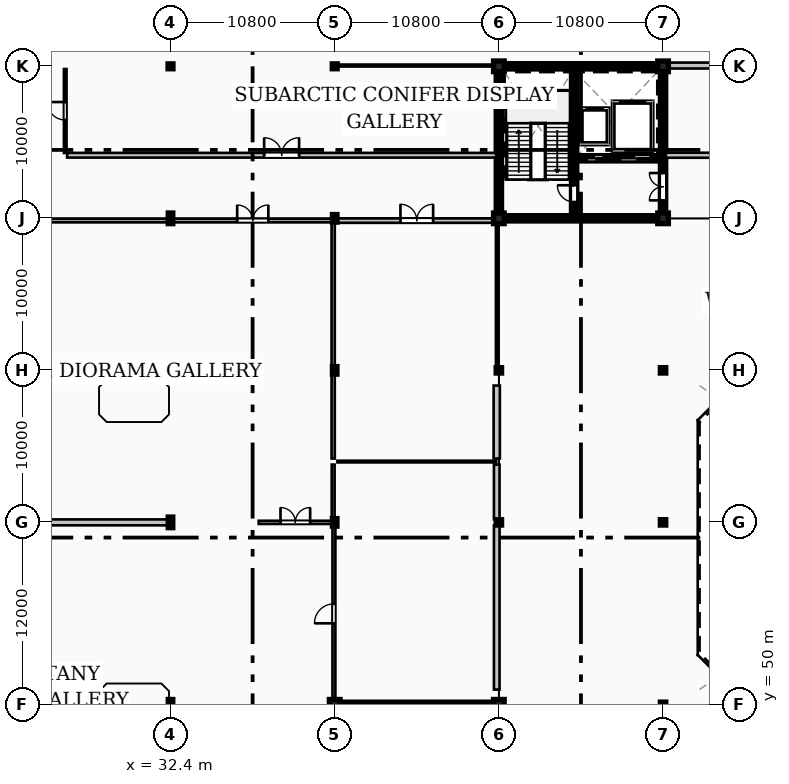
"""IFC4 building model, lengths in metres.
Left out: names, types, materials, properties, quantities, classifications, styles, units other than length and angle.
Written with IfcOpenShell. Run it as: python <this file> out.ifc"""

import sys

from ifc_helpers import new_model, si_unit, direction, frame, frame_2d, origin, origin_2d, place, context, subcontext, project, spatial, rectangle, hollow_circle, i_section, extrude, element, fill, save


model = new_model("IFC4")
c1 = context("Model", 3, precision=1e-05, world=origin(), true_north=direction((0.0, 1.0)))
c2 = subcontext(c1, "Body", "Model", "MODEL_VIEW")
j1 = project(units=[si_unit("LENGTHUNIT", "METRE"), si_unit("PLANEANGLEUNIT", "RADIAN")], contexts=[c1])
p1 = place(None, origin())
s1 = spatial("IfcSite", under=j1, at=p1, CompositionType="ELEMENT")
p2 = place(p1, origin())
s2 = spatial("IfcBuilding", under=s1, at=p2, CompositionType="ELEMENT")
p3 = place(p2, frame((0.0, 0.0, 4.8)))
s3 = spatial("IfcBuildingStorey", under=s2, at=p3, CompositionType="ELEMENT", Elevation=4.8)
for number, where, z_axis, x_axis in (
    (1, (32.4, 50.0, 0.0), (0.0, 0.0, 1.0), (1.0, 0.0, 0.0)),
    (2, (32.4, 62.0, 0.0), (0.0, 0.0, 1.0), (1.0, 0.0, 0.0)),
    (3, (32.4, 72.0, 0.0), (0.0, 0.0, 1.0), (1.0, 0.0, 0.0)),
    (4, (32.4, 82.0, 0.0), (0.0, 0.0, 1.0), (1.0, 0.0, 0.0)),
):
    element("IfcColumn", number, at=place(p3, frame(where, z_axis=z_axis, x_axis=x_axis)), inside=s3, PredefinedType="COLUMN", context=c2, shape_type="SweptSolid", body=[
        extrude(i_section(OverallWidth=0.3, OverallDepth=0.7, WebThickness=0.017, FlangeThickness=0.032, FilletRadius=0.027, at=origin_2d()), origin(), (0.0, 0.0, 1.0), 4.8),
    ])
p4 = place(p3, frame((32.4, 92.0, 0.0), z_axis=(0.0, 0.0, 1.0), x_axis=(1.0, 0.0, 0.0)))
e5 = element("IfcColumn", 5, at=p4, inside=s3, PredefinedType="COLUMN", context=c2, shape_type="SweptSolid", body=[
    extrude(hollow_circle(Radius=0.162, WallThickness=0.014, at=origin_2d()), origin(), (0.0, 0.0, 1.0), 4.8),
])
p5 = place(p3, frame((43.2, 50.0, 0.0), z_axis=(0.0, 0.0, 1.0), x_axis=(1.0, 0.0, 0.0)))
e6 = element("IfcColumn", 6, at=p5, inside=s3, PredefinedType="COLUMN", context=c2, shape_type="SweptSolid", body=[
    extrude(rectangle(XDim=0.7, YDim=0.7, at=origin_2d()), origin(), (0.0, 0.0, 1.0), 4.8),
])
for number, where, z_axis, x_axis in (
    (7, (43.2, 62.0, 0.0), (0.0, 0.0, 1.0), (1.0, 0.0, 0.0)),
    (8, (43.2, 72.0, 0.0), (0.0, 0.0, 1.0), (1.0, 0.0, 0.0)),
    (9, (43.2, 82.0, 0.0), (0.0, 0.0, 1.0), (1.0, 0.0, 0.0)),
):
    element("IfcColumn", number, at=place(p3, frame(where, z_axis=z_axis, x_axis=x_axis)), inside=s3, PredefinedType="COLUMN", context=c2, shape_type="SweptSolid", body=[
        extrude(i_section(OverallWidth=0.3, OverallDepth=0.5, WebThickness=0.014, FlangeThickness=0.028, FilletRadius=0.027, at=origin_2d()), origin(), (0.0, 0.0, 1.0), 4.8),
    ])
p6 = place(p3, frame((43.2, 92.0, 0.0), z_axis=(0.0, 0.0, 1.0), x_axis=(1.0, 0.0, 0.0)))
e10 = element("IfcColumn", 10, at=p6, inside=s3, PredefinedType="COLUMN", context=c2, shape_type="SweptSolid", body=[
    extrude(hollow_circle(Radius=0.162, WallThickness=0.014, at=origin_2d()), origin(), (0.0, 0.0, 1.0), 4.8),
])
p7 = place(p3, frame((54.0, 50.0, 0.0), z_axis=(0.0, 0.0, 1.0), x_axis=(1.0, 0.0, 0.0)))
e11 = element("IfcColumn", 11, at=p7, inside=s3, PredefinedType="COLUMN", context=c2, shape_type="SweptSolid", body=[
    extrude(rectangle(XDim=0.7, YDim=0.7, at=origin_2d()), origin(), (0.0, 0.0, 1.0), 4.8),
])
for number, where, z_axis, x_axis in (
    (12, (54.0, 62.0, 0.0), (0.0, 0.0, 1.0), (1.0, 0.0, 0.0)),
    (13, (54.0, 72.0, 0.0), (0.0, 0.0, 1.0), (1.0, 0.0, 0.0)),
):
    element("IfcColumn", number, at=place(p3, frame(where, z_axis=z_axis, x_axis=x_axis)), inside=s3, PredefinedType="COLUMN", context=c2, shape_type="SweptSolid", body=[
        extrude(hollow_circle(Radius=0.178, WallThickness=0.016, at=origin_2d()), origin(), (0.0, 0.0, 1.0), 4.8),
    ])
for number, where, z_axis, x_axis in (
    (14, (54.0, 82.0, 0.0), (0.0, 0.0, 1.0), (1.0, 0.0, 0.0)),
    (15, (54.0, 92.0, 0.0), (0.0, 0.0, 1.0), (1.0, 0.0, 0.0)),
):
    element("IfcColumn", number, at=place(p3, frame(where, z_axis=z_axis, x_axis=x_axis)), inside=s3, PredefinedType="COLUMN", context=c2, shape_type="SweptSolid", body=[
        extrude(rectangle(XDim=0.7, YDim=0.7, at=origin_2d()), origin(), (0.0, 0.0, 1.0), 4.8),
    ])
for number, where, z_axis, x_axis in (
    (16, (64.8, 50.0, 0.0), (0.0, 0.0, 1.0), (1.0, 0.0, 0.0)),
    (17, (64.8, 62.0, 0.0), (0.0, 0.0, 1.0), (1.0, 0.0, 0.0)),
    (18, (64.8, 72.0, 0.0), (0.0, 0.0, 1.0), (1.0, 0.0, 0.0)),
):
    element("IfcColumn", number, at=place(p3, frame(where, z_axis=z_axis, x_axis=x_axis)), inside=s3, PredefinedType="COLUMN", context=c2, shape_type="SweptSolid", body=[
        extrude(hollow_circle(Radius=0.178, WallThickness=0.016, at=origin_2d()), origin(), (0.0, 0.0, 1.0), 4.8),
    ])
for number, where, z_axis, x_axis in (
    (19, (64.8, 82.0, 0.0), (0.0, 0.0, 1.0), (1.0, 0.0, 0.0)),
    (20, (64.8, 92.0, 0.0), (0.0, 0.0, 1.0), (1.0, 0.0, 0.0)),
):
    element("IfcColumn", number, at=place(p3, frame(where, z_axis=z_axis, x_axis=x_axis)), inside=s3, PredefinedType="COLUMN", context=c2, shape_type="SweptSolid", body=[
        extrude(rectangle(XDim=0.7, YDim=0.7, at=origin_2d()), origin(), (0.0, 0.0, 1.0), 4.8),
    ])
for number, where, z_axis, x_axis in (
    (21, (54.35, 82.0, 0.0), (0.0, 0.0, 1.0), (1.0, 0.0, 0.0)),
    (22, (54.35, 92.0, 0.0), (0.0, 0.0, 1.0), (1.0, 0.0, 0.0)),
):
    element("IfcWall", number, at=place(p3, frame(where, z_axis=z_axis, x_axis=x_axis)), inside=s3, PredefinedType="SHEAR", context=c2, shape_type="SweptSolid", body=[
        extrude(rectangle(XDim=10.1, YDim=0.35, at=frame_2d((5.05, 0.0))), origin(), (0.0, 0.0, 1.0), 4.56),
    ])
p8 = place(p3, frame((54.0, 82.35, 0.0), z_axis=(0.0, 0.0, 1.0), x_axis=(0.0, 1.0, 0.0)))
e23 = element("IfcWall", 23, at=p8, inside=s3, PredefinedType="SHEAR", context=c2, shape_type="SweptSolid", body=[
    extrude(rectangle(XDim=9.3, YDim=0.35, at=frame_2d((4.65, 0.0))), origin(), (0.0, 0.0, 1.0), 4.56),
])
p9 = place(p3, frame((64.8, 82.35, 0.0), z_axis=(0.0, 0.0, 1.0), x_axis=(0.0, 1.0, 0.0)))
e24 = element("IfcWall", 24, at=p9, inside=s3, PredefinedType="SHEAR", context=c2, shape_type="SweptSolid", body=[
    extrude(rectangle(XDim=9.3, YDim=0.35, at=frame_2d((4.65, 0.0))), origin(), (0.0, 0.0, 1.0), 4.56),
])
p10 = place(p9, frame((0.83, 0.0, 0.0)))
e25 = element("IfcOpeningElement", 25, at=p10, cuts=e24, PredefinedType="OPENING", context=c2, shape_type="SweptSolid", body=[
    extrude(rectangle(XDim=1.8, YDim=2.25, at=frame_2d((0.9, 1.125))), frame((0.0, 0.185, 0.0), z_axis=(0.0, -1.0, 0.0), x_axis=(1.0, 0.0, 0.0)), (0.0, 0.0, 1.0), 0.37),
])
p11 = place(p3, frame((58.95, 82.175, 0.0), z_axis=(0.0, 0.0, 1.0), x_axis=(0.0, 1.0, 0.0)))
e26 = element("IfcWall", 26, at=p11, inside=s3, PredefinedType="SHEAR", context=c2, shape_type="SweptSolid", body=[
    extrude(rectangle(XDim=9.65, YDim=0.35, at=frame_2d((4.825, 0.0))), origin(), (0.0, 0.0, 1.0), 4.56),
])
p12 = place(p11, frame((0.9, 0.0, 0.0)))
e27 = element("IfcOpeningElement", 27, at=p12, cuts=e26, PredefinedType="OPENING", context=c2, shape_type="SweptSolid", body=[
    extrude(rectangle(XDim=1.1, YDim=2.2, at=frame_2d((0.55, 1.1))), frame((0.0, 0.185, 0.0), z_axis=(0.0, -1.0, 0.0), x_axis=(1.0, 0.0, 0.0)), (0.0, 0.0, 1.0), 0.37),
])
p13 = place(p3, frame((59.13, 85.95, 0.0), z_axis=(0.0, 0.0, 1.0), x_axis=(1.0, 0.0, 0.0)))
e28 = element("IfcWall", 28, at=p13, inside=s3, PredefinedType="SHEAR", context=c2, shape_type="SweptSolid", body=[
    extrude(rectangle(XDim=5.49, YDim=0.35, at=frame_2d((2.745, 0.0))), origin(), (0.0, 0.0, 1.0), 4.56),
])
p14 = place(p13, frame((0.65, 0.0, 0.0)))
e29 = element("IfcOpeningElement", 29, at=p14, cuts=e28, PredefinedType="OPENING", context=c2, shape_type="SweptSolid", body=[
    extrude(rectangle(XDim=1.1, YDim=2.2, at=frame_2d((0.55, 1.1))), frame((0.0, 0.185, 0.0), z_axis=(0.0, -1.0, 0.0), x_axis=(1.0, 0.0, 0.0)), (0.0, 0.0, 1.0), 0.37),
])
p15 = place(p13, frame((2.85, 0.0, 0.0)))
e30 = element("IfcOpeningElement", 30, at=p15, cuts=e28, PredefinedType="OPENING", context=c2, shape_type="SweptSolid", body=[
    extrude(rectangle(XDim=2.0, YDim=2.5, at=frame_2d((1.0, 1.25))), frame((0.0, 0.185, 0.0), z_axis=(0.0, -1.0, 0.0), x_axis=(1.0, 0.0, 0.0)), (0.0, 0.0, 1.0), 0.37),
])
p16 = place(p3, frame((43.55, 50.0, 0.0), z_axis=(0.0, 0.0, 1.0), x_axis=(1.0, 0.0, 0.0)))
e31 = element("IfcWall", 31, at=p16, inside=s3, PredefinedType="SHEAR", context=c2, shape_type="SweptSolid", body=[
    extrude(rectangle(XDim=10.1, YDim=0.35, at=frame_2d((5.05, 0.0))), origin(), (0.0, 0.0, 1.0), 4.56),
])
p17 = place(p3, frame((38.2, 62.0, 0.0), z_axis=(0.0, 0.0, 1.0), x_axis=(1.0, 0.0, 0.0)))
e32 = element("IfcWall", 32, at=p17, inside=s3, PredefinedType="PARTITIONING", context=c2, shape_type="SweptSolid", body=[
    extrude(rectangle(XDim=4.82, YDim=0.21, at=frame_2d((2.41, 0.0))), origin(), (0.0, 0.0, 1.0), 4.049),
])
p18 = place(p17, frame((1.435, 0.0, 0.0)))
e33 = element("IfcOpeningElement", 33, at=p18, cuts=e32, PredefinedType="OPENING", context=c2, shape_type="SweptSolid", body=[
    extrude(rectangle(XDim=1.95, YDim=2.5, at=frame_2d((0.975, 1.25))), frame((0.0, 0.115, 0.0), z_axis=(0.0, -1.0, 0.0), x_axis=(1.0, 0.0, 0.0)), (0.0, 0.0, 1.0), 0.23),
])
p19 = place(p3, frame((21.78, 81.85, 0.0), z_axis=(0.0, 0.0, 1.0), x_axis=(1.0, 0.0, 0.0)))
e34 = element("IfcWall", 34, at=p19, inside=s3, PredefinedType="PARTITIONING", context=c2, shape_type="SweptSolid", body=[
    extrude(rectangle(XDim=10.42, YDim=0.23, at=frame_2d((5.21, 0.0))), origin(), (0.0, 0.0, 1.0), 3.939),
])
p20 = place(p3, frame((32.6, 81.85, 0.0), z_axis=(0.0, 0.0, 1.0), x_axis=(1.0, 0.0, 0.0)))
e35 = element("IfcWall", 35, at=p20, inside=s3, PredefinedType="PARTITIONING", context=c2, shape_type="SweptSolid", body=[
    extrude(rectangle(XDim=10.42, YDim=0.23, at=frame_2d((5.21, 0.0))), origin(), (0.0, 0.0, 1.0), 4.04),
])
p21 = place(p20, frame((4.185, 0.0, 0.0)))
e36 = element("IfcOpeningElement", 36, at=p21, cuts=e35, PredefinedType="OPENING", context=c2, shape_type="SweptSolid", body=[
    extrude(rectangle(XDim=2.05, YDim=2.55, at=frame_2d((1.025, 1.275))), frame((0.0, 0.125, 0.0), z_axis=(0.0, -1.0, 0.0), x_axis=(1.0, 0.0, 0.0)), (0.0, 0.0, 1.0), 0.25),
])
p22 = place(p3, frame((43.38, 81.85, 0.0), z_axis=(0.0, 0.0, 1.0), x_axis=(1.0, 0.0, 0.0)))
e37 = element("IfcWall", 37, at=p22, inside=s3, PredefinedType="PARTITIONING", context=c2, shape_type="SweptSolid", body=[
    extrude(rectangle(XDim=10.44, YDim=0.29, at=frame_2d((5.22, 0.0))), origin(), (0.0, 0.0, 1.0), 4.04),
])
p23 = place(p22, frame((4.145, 0.0, 0.0)))
e38 = element("IfcOpeningElement", 38, at=p23, cuts=e37, PredefinedType="OPENING", context=c2, shape_type="SweptSolid", body=[
    extrude(rectangle(XDim=2.15, YDim=2.6, at=frame_2d((1.075, 1.3))), frame((0.0, 0.155, 0.0), z_axis=(0.0, -1.0, 0.0), x_axis=(1.0, 0.0, 0.0)), (0.0, 0.0, 1.0), 0.31),
])
p24 = place(p3, frame((25.6, 86.15, 0.0), z_axis=(0.0, 0.0, 1.0), x_axis=(1.0, 0.0, 0.0)))
e39 = element("IfcWall", 39, at=p24, inside=s3, PredefinedType="PARTITIONING", context=c2, shape_type="SweptSolid", body=[
    extrude(rectangle(XDim=28.22, YDim=0.31, at=frame_2d((14.11, 0.0))), origin(), (0.0, 0.0, 1.0), 4.52),
])
p25 = place(p24, frame((12.96, 0.0, 0.0)))
e40 = element("IfcOpeningElement", 40, at=p25, cuts=e39, PredefinedType="OPENING", context=c2, shape_type="SweptSolid", body=[
    extrude(rectangle(XDim=2.3, YDim=2.65, at=frame_2d((1.15, 1.325))), frame((0.0, 0.165, 0.0), z_axis=(0.0, -1.0, 0.0), x_axis=(1.0, 0.0, 0.0)), (0.0, 0.0, 1.0), 0.33),
])
p26 = place(p3, frame((64.98, 86.15, 0.0), z_axis=(0.0, 0.0, 1.0), x_axis=(1.0, 0.0, 0.0)))
e41 = element("IfcWall", 41, at=p26, inside=s3, PredefinedType="PARTITIONING", context=c2, shape_type="SweptSolid", body=[
    extrude(rectangle(XDim=42.84, YDim=0.33, at=frame_2d((21.42, 0.0))), origin(), (0.0, 0.0, 1.0), 4.52),
])
p27 = place(p26, frame((20.17, 0.0, 0.0)))
e42 = element("IfcOpeningElement", 42, at=p27, cuts=e41, PredefinedType="OPENING", context=c2, shape_type="SweptSolid", body=[
    extrude(rectangle(XDim=2.5, YDim=2.75, at=frame_2d((1.25, 1.375))), frame((0.0, 0.175, 0.0), z_axis=(0.0, -1.0, 0.0), x_axis=(1.0, 0.0, 0.0)), (0.0, 0.0, 1.0), 0.35),
])
p28 = place(p3, frame((64.98, 92.05, 0.0), z_axis=(0.0, 0.0, 1.0), x_axis=(1.0, 0.0, 0.0)))
e43 = element("IfcWall", 43, at=p28, inside=s3, PredefinedType="PARTITIONING", context=c2, shape_type="SweptSolid", body=[
    extrude(rectangle(XDim=10.42, YDim=0.39, at=frame_2d((5.21, 0.0))), origin(), (0.0, 0.0, 1.0), 4.069),
])
p29 = place(p28, frame((3.86, 0.0, 0.0)))
e44 = element("IfcOpeningElement", 44, at=p29, cuts=e43, PredefinedType="OPENING", context=c2, shape_type="SweptSolid", body=[
    extrude(rectangle(XDim=2.7, YDim=2.85, at=frame_2d((1.35, 1.425))), frame((0.0, 0.205, 0.0), z_axis=(0.0, -1.0, 0.0), x_axis=(1.0, 0.0, 0.0)), (0.0, 0.0, 1.0), 0.41),
])
p30 = place(p3, frame((25.475, 86.3, 0.0), z_axis=(0.0, 0.0, 1.0), x_axis=(0.0, 1.0, 0.0)))
e45 = element("IfcWall", 45, at=p30, inside=s3, PredefinedType="PARTITIONING", context=c2, shape_type="SweptSolid", body=[
    extrude(rectangle(XDim=5.52, YDim=0.17, at=frame_2d((2.76, 0.0))), origin(), (0.0, 0.0, 1.0), 4.52),
])
p31 = place(p30, frame((2.17, 0.0, 0.0)))
e46 = element("IfcOpeningElement", 46, at=p31, cuts=e45, PredefinedType="OPENING", context=c2, shape_type="SweptSolid", body=[
    extrude(rectangle(XDim=1.18, YDim=2.28, at=frame_2d((0.59, 1.14))), frame((0.0, 0.095, 0.0), z_axis=(0.0, -1.0, 0.0), x_axis=(1.0, 0.0, 0.0)), (0.0, 0.0, 1.0), 0.19),
])
p32 = place(p3, frame((43.15, 50.18, 0.0), z_axis=(0.0, 0.0, 1.0), x_axis=(0.0, 1.0, 0.0)))
e47 = element("IfcWall", 47, at=p32, inside=s3, PredefinedType="PARTITIONING", context=c2, shape_type="SweptSolid", body=[
    extrude(rectangle(XDim=11.64, YDim=0.19, at=frame_2d((5.82, 0.0))), origin(), (0.0, 0.0, 1.0), 3.939),
])
p33 = place(p32, frame((5.18, 0.0, 0.0)))
e48 = element("IfcOpeningElement", 48, at=p33, cuts=e47, PredefinedType="OPENING", context=c2, shape_type="SweptSolid", body=[
    extrude(rectangle(XDim=1.28, YDim=2.32, at=frame_2d((0.64, 1.16))), frame((0.0, 0.105, 0.0), z_axis=(0.0, -1.0, 0.0), x_axis=(1.0, 0.0, 0.0)), (0.0, 0.0, 1.0), 0.21),
])
p34 = place(p3, frame((21.8, 62.0, 0.0), z_axis=(0.0, 0.0, 1.0), x_axis=(1.0, 0.0, 0.0)))
e49 = element("IfcWall", 49, at=p34, inside=s3, PredefinedType="PARTITIONING", context=c2, shape_type="SweptSolid", body=[
    extrude(rectangle(XDim=10.4, YDim=0.39, at=frame_2d((5.2, 0.0))), origin(), (0.0, 0.0, 1.0), 3.939),
])
p35 = place(p3, frame((43.38, 66.0, 0.0), z_axis=(0.0, 0.0, 1.0), x_axis=(1.0, 0.0, 0.0)))
e50 = element("IfcWall", 50, at=p35, inside=s3, PredefinedType="PARTITIONING", context=c2, shape_type="SweptSolid", body=[
    extrude(rectangle(XDim=10.44, YDim=0.11, at=frame_2d((5.22, 0.0))), origin(), (0.0, 0.0, 1.0), 4.52),
])
p36 = place(p3, frame((43.38, 92.05, 0.0), z_axis=(0.0, 0.0, 1.0), x_axis=(1.0, 0.0, 0.0)))
e51 = element("IfcWall", 51, at=p36, inside=s3, PredefinedType="PARTITIONING", context=c2, shape_type="SweptSolid", body=[
    extrude(rectangle(XDim=10.44, YDim=0.13, at=frame_2d((5.22, 0.0))), origin(), (0.0, 0.0, 1.0), 4.069),
])
p37 = place(p3, frame((43.1, 62.18, 0.0), z_axis=(0.0, 0.0, 1.0), x_axis=(0.0, 1.0, 0.0)))
e52 = element("IfcWall", 52, at=p37, inside=s3, PredefinedType="PARTITIONING", context=c2, shape_type="SweptSolid", body=[
    extrude(rectangle(XDim=3.62, YDim=0.19, at=frame_2d((1.81, 0.0))), origin(), (0.0, 0.0, 1.0), 4.04),
])
p38 = place(p3, frame((43.1, 66.2, 0.0), z_axis=(0.0, 0.0, 1.0), x_axis=(0.0, 1.0, 0.0)))
e53 = element("IfcWall", 53, at=p38, inside=s3, PredefinedType="PARTITIONING", context=c2, shape_type="SweptSolid", body=[
    extrude(rectangle(XDim=5.6, YDim=0.21, at=frame_2d((2.8, 0.0))), origin(), (0.0, 0.0, 1.0), 4.04),
])
p39 = place(p3, frame((43.1, 72.2, 0.0), z_axis=(0.0, 0.0, 1.0), x_axis=(0.0, 1.0, 0.0)))
e54 = element("IfcWall", 54, at=p39, inside=s3, PredefinedType="PARTITIONING", context=c2, shape_type="SweptSolid", body=[
    extrude(rectangle(XDim=9.62, YDim=0.21, at=frame_2d((4.81, 0.0))), origin(), (0.0, 0.0, 1.0), 4.04),
])
p40 = place(p3, frame((53.86, 51.0, 0.0), z_axis=(0.0, 0.0, 1.0), x_axis=(0.0, 1.0, 0.0)))
e55 = element("IfcWall", 55, at=p40, inside=s3, PredefinedType="PARTITIONING", context=c2, shape_type="SweptSolid", body=[
    extrude(rectangle(XDim=10.8, YDim=0.37, at=frame_2d((5.4, 0.0))), origin(), (0.0, 0.0, 1.0), 4.52),
])
p41 = place(p3, frame((53.86, 62.2, 0.0), z_axis=(0.0, 0.0, 1.0), x_axis=(0.0, 1.0, 0.0)))
e56 = element("IfcWall", 56, at=p41, inside=s3, PredefinedType="PARTITIONING", context=c2, shape_type="SweptSolid", body=[
    extrude(rectangle(XDim=3.6, YDim=0.37, at=frame_2d((1.8, 0.0))), origin(), (0.0, 0.0, 1.0), 4.52),
])
p42 = place(p3, frame((53.86, 66.2, 0.0), z_axis=(0.0, 0.0, 1.0), x_axis=(0.0, 1.0, 0.0)))
e57 = element("IfcWall", 57, at=p42, inside=s3, PredefinedType="PARTITIONING", context=c2, shape_type="SweptSolid", body=[
    extrude(rectangle(XDim=4.8, YDim=0.41, at=frame_2d((2.4, 0.0))), origin(), (0.0, 0.0, 1.0), 4.52),
])
p43 = place(p3, frame((53.86, 72.2, 0.0), z_axis=(0.0, 0.0, 1.0), x_axis=(0.0, 1.0, 0.0)))
e58 = element("IfcWall", 58, at=p43, inside=s3, PredefinedType="PARTITIONING", context=c2, shape_type="SweptSolid", body=[
    extrude(rectangle(XDim=9.62, YDim=0.11, at=frame_2d((4.81, 0.0))), origin(), (0.0, 0.0, 1.0), 4.52),
])
p44 = place(p12, origin())
e59 = element("IfcDoor", 59, at=p44, inside=s3, OperationType="SINGLE_SWING_RIGHT", PredefinedType="DOOR", context=c2, shape_type="SweptSolid", body=[
    extrude(rectangle(XDim=1.1, YDim=2.2, at=frame_2d((0.55, 1.1))), frame((0.0, 0.025, 0.0), z_axis=(0.0, -1.0, 0.0), x_axis=(1.0, 0.0, 0.0)), (0.0, 0.0, 1.0), 0.05),
])
fill(e27, e59)
p45 = place(p10, origin())
e60 = element("IfcDoor", 60, at=p45, inside=s3, OperationType="DOUBLE_DOOR_SINGLE_SWING", PredefinedType="DOOR", context=c2, shape_type="SweptSolid", body=[
    extrude(rectangle(XDim=1.8, YDim=2.25, at=frame_2d((0.9, 1.125))), frame((0.0, 0.025, 0.0), z_axis=(0.0, -1.0, 0.0), x_axis=(1.0, 0.0, 0.0)), (0.0, 0.0, 1.0), 0.05),
])
fill(e25, e60)
p46 = place(p14, origin())
e61 = element("IfcDoor", 61, at=p46, inside=s3, OperationType="DOUBLE_DOOR_SLIDING", PredefinedType="DOOR", context=c2, shape_type="SweptSolid", body=[
    extrude(rectangle(XDim=1.1, YDim=2.2, at=frame_2d((0.55, 1.1))), frame((0.0, 0.025, 0.0), z_axis=(0.0, -1.0, 0.0), x_axis=(1.0, 0.0, 0.0)), (0.0, 0.0, 1.0), 0.05),
])
fill(e29, e61)
p47 = place(p15, origin())
e62 = element("IfcDoor", 62, at=p47, inside=s3, OperationType="DOUBLE_DOOR_SLIDING", PredefinedType="DOOR", context=c2, shape_type="SweptSolid", body=[
    extrude(rectangle(XDim=2.0, YDim=2.5, at=frame_2d((1.0, 1.25))), frame((0.0, 0.025, 0.0), z_axis=(0.0, -1.0, 0.0), x_axis=(1.0, 0.0, 0.0)), (0.0, 0.0, 1.0), 0.05),
])
fill(e30, e62)
p48 = place(p18, origin())
e63 = element("IfcDoor", 63, at=p48, inside=s3, OperationType="DOUBLE_DOOR_SINGLE_SWING", PredefinedType="DOOR", context=c2, shape_type="SweptSolid", body=[
    extrude(rectangle(XDim=1.95, YDim=2.5, at=frame_2d((0.975, 1.25))), frame((0.0, 0.025, 0.0), z_axis=(0.0, -1.0, 0.0), x_axis=(1.0, 0.0, 0.0)), (0.0, 0.0, 1.0), 0.05),
])
fill(e33, e63)
p49 = place(p21, origin())
e64 = element("IfcDoor", 64, at=p49, inside=s3, OperationType="DOUBLE_DOOR_SINGLE_SWING", PredefinedType="DOOR", context=c2, shape_type="SweptSolid", body=[
    extrude(rectangle(XDim=2.05, YDim=2.55, at=frame_2d((1.025, 1.275))), frame((0.0, 0.025, 0.0), z_axis=(0.0, -1.0, 0.0), x_axis=(1.0, 0.0, 0.0)), (0.0, 0.0, 1.0), 0.05),
])
fill(e36, e64)
p50 = place(p23, origin())
e65 = element("IfcDoor", 65, at=p50, inside=s3, OperationType="DOUBLE_DOOR_SINGLE_SWING", PredefinedType="DOOR", context=c2, shape_type="SweptSolid", body=[
    extrude(rectangle(XDim=2.15, YDim=2.6, at=frame_2d((1.075, 1.3))), frame((0.0, 0.025, 0.0), z_axis=(0.0, -1.0, 0.0), x_axis=(1.0, 0.0, 0.0)), (0.0, 0.0, 1.0), 0.05),
])
fill(e38, e65)
p51 = place(p25, origin())
e66 = element("IfcDoor", 66, at=p51, inside=s3, OperationType="DOUBLE_DOOR_SINGLE_SWING", PredefinedType="DOOR", context=c2, shape_type="SweptSolid", body=[
    extrude(rectangle(XDim=2.3, YDim=2.65, at=frame_2d((1.15, 1.325))), frame((0.0, 0.025, 0.0), z_axis=(0.0, -1.0, 0.0), x_axis=(1.0, 0.0, 0.0)), (0.0, 0.0, 1.0), 0.05),
])
fill(e40, e66)
p52 = place(p31, origin())
e67 = element("IfcDoor", 67, at=p52, inside=s3, OperationType="SINGLE_SWING_RIGHT", PredefinedType="DOOR", context=c2, shape_type="SweptSolid", body=[
    extrude(rectangle(XDim=1.18, YDim=2.28, at=frame_2d((0.59, 1.14))), frame((0.0, 0.025, 0.0), z_axis=(0.0, -1.0, 0.0), x_axis=(1.0, 0.0, 0.0)), (0.0, 0.0, 1.0), 0.05),
])
fill(e46, e67)
p53 = place(p33, origin())
e68 = element("IfcDoor", 68, at=p53, inside=s3, OperationType="SINGLE_SWING_LEFT", PredefinedType="DOOR", context=c2, shape_type="SweptSolid", body=[
    extrude(rectangle(XDim=1.28, YDim=2.32, at=frame_2d((0.64, 1.16))), frame((0.0, 0.025, 0.0), z_axis=(0.0, -1.0, 0.0), x_axis=(1.0, 0.0, 0.0)), (0.0, 0.0, 1.0), 0.05),
])
fill(e48, e68)
save(model, sys.argv[1])
